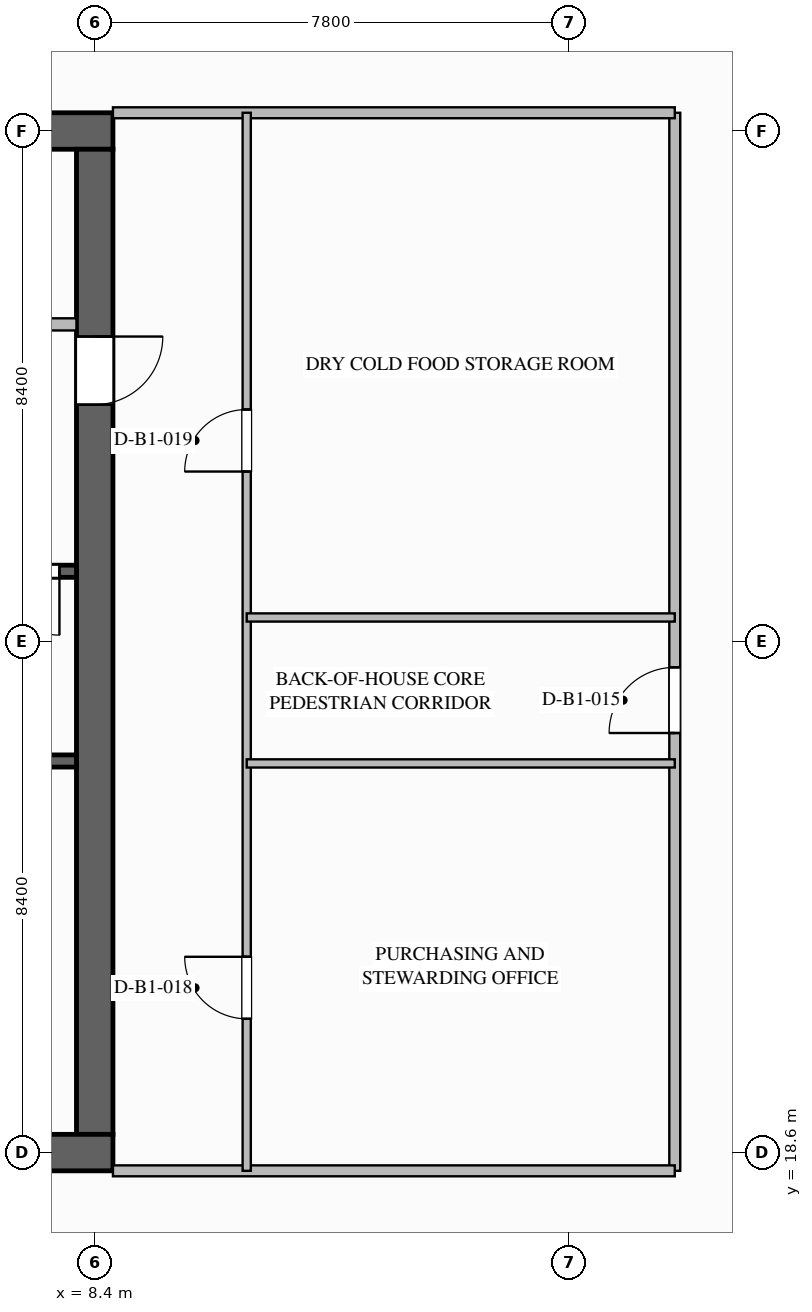
"""IFC4 building model, lengths in metres.
Left out: names, types, materials, properties, quantities, classifications, styles, units other than length and angle.
Written with IfcOpenShell. Run it as: python <this file> out.ifc"""

import sys

from ifc_helpers import new_model, si_unit, direction, frame, frame_2d, origin, place, context, subcontext, project, spatial, rectangle, extrude, element, fill, save


model = new_model("IFC4")
c1 = context("Model", 3, precision=1e-05, world=origin(), true_north=direction((0.0, 1.0)))
c2 = subcontext(c1, "Body", "Model", "MODEL_VIEW")
j1 = project(units=[si_unit("LENGTHUNIT", "METRE"), si_unit("PLANEANGLEUNIT", "RADIAN")], contexts=[c1])
p1 = place(None, origin())
s1 = spatial("IfcSite", under=j1, at=p1, CompositionType="ELEMENT")
p2 = place(p1, origin())
s2 = spatial("IfcBuilding", under=s1, at=p2, CompositionType="ELEMENT")
p3 = place(p2, frame((0.0, 0.0, -5.4)))
s3 = spatial("IfcBuildingStorey", under=s2, at=p3, CompositionType="ELEMENT", Elevation=-5.4)
p4 = place(p3, frame((-8.7, 35.4, 0.0), z_axis=(0.0, 0.0, 1.0), x_axis=(1.0, 0.0, 0.0)))
e1 = element("IfcWall", 1, at=p4, inside=s3, PredefinedType="SHEAR", context=c2, shape_type="SweptSolid", body=[
    extrude(rectangle(XDim=17.4, YDim=0.6, at=frame_2d((8.7, 0.0))), origin(), (0.0, 0.0, 1.0), 5.4),
])
p5 = place(p3, frame((8.4, 35.1, 0.0), z_axis=(0.0, 0.0, 1.0), x_axis=(0.0, -1.0, 0.0)))
e2 = element("IfcWall", 2, at=p5, inside=s3, PredefinedType="SHEAR", context=c2, shape_type="SweptSolid", body=[
    extrude(rectangle(XDim=16.2, YDim=0.6, at=frame_2d((8.1, 0.0))), origin(), (0.0, 0.0, 1.0), 5.4),
])
p6 = place(p5, frame((3.08, 0.0, 0.0)))
e3 = element("IfcOpeningElement", 3, at=p6, cuts=e2, PredefinedType="OPENING", context=c2, shape_type="SweptSolid", body=[
    extrude(rectangle(XDim=1.12, YDim=2.1, at=frame_2d((0.56, 1.05))), frame((0.0, 0.31, 0.0), z_axis=(0.0, -1.0, 0.0), x_axis=(1.0, 0.0, 0.0)), (0.0, 0.0, 1.0), 0.62),
])
p7 = place(p3, frame((8.7, 18.6, 0.0), z_axis=(0.0, 0.0, 1.0), x_axis=(-1.0, 0.0, 0.0)))
e4 = element("IfcWall", 4, at=p7, inside=s3, PredefinedType="SHEAR", context=c2, shape_type="SweptSolid", body=[
    extrude(rectangle(XDim=17.4, YDim=0.6, at=frame_2d((8.7, 0.0))), origin(), (0.0, 0.0, 1.0), 5.4),
])
p8 = place(p3, frame((0.0, 25.04, 0.0), z_axis=(0.0, 0.0, 1.0), x_axis=(1.0, 0.0, 0.0)))
e5 = element("IfcWall", 5, at=p8, inside=s3, PredefinedType="SOLIDWALL", context=c2, shape_type="SweptSolid", body=[
    extrude(rectangle(XDim=8.1, YDim=0.2, at=frame_2d((4.05, 0.0))), origin(), (0.0, 0.0, 1.0), 5.05),
])
p9 = place(p3, frame((8.1, 28.16, 0.0), z_axis=(0.0, 0.0, 1.0), x_axis=(-1.0, 0.0, 0.0)))
e6 = element("IfcWall", 6, at=p9, inside=s3, PredefinedType="SOLIDWALL", context=c2, shape_type="SweptSolid", body=[
    extrude(rectangle(XDim=8.1, YDim=0.2, at=frame_2d((4.05, 0.0))), origin(), (0.0, 0.0, 1.0), 5.05),
])
p10 = place(p9, frame((0.28, 0.0, 0.0)))
e7 = element("IfcOpeningElement", 7, at=p10, cuts=e6, PredefinedType="OPENING", context=c2, shape_type="SweptSolid", body=[
    extrude(rectangle(XDim=1.05, YDim=2.1, at=frame_2d((0.525, 1.05))), frame((0.0, 0.11, 0.0), z_axis=(0.0, -1.0, 0.0), x_axis=(1.0, 0.0, 0.0)), (0.0, 0.0, 1.0), 0.22),
])
p11 = place(p3, frame((3.1, 32.22, 0.0), z_axis=(0.0, 0.0, 1.0), x_axis=(1.0, 0.0, 0.0)))
e8 = element("IfcWall", 8, at=p11, inside=s3, PredefinedType="SOLIDWALL", context=c2, shape_type="SweptSolid", body=[
    extrude(rectangle(XDim=5.0, YDim=0.2, at=frame_2d((2.5, 0.0))), origin(), (0.0, 0.0, 1.0), 5.05),
])
p12 = place(p11, frame((0.55, 0.0, 0.0)))
e9 = element("IfcOpeningElement", 9, at=p12, cuts=e8, PredefinedType="OPENING", context=c2, shape_type="SweptSolid", body=[
    extrude(rectangle(XDim=1.2, YDim=2.2, at=frame_2d((0.6, 1.1))), frame((0.0, 0.11, 0.0), z_axis=(0.0, -1.0, 0.0), x_axis=(1.0, 0.0, 0.0)), (0.0, 0.0, 1.0), 0.22),
])
p13 = place(p11, frame((2.85, 0.0, 0.0)))
e10 = element("IfcOpeningElement", 10, at=p13, cuts=e8, PredefinedType="OPENING", context=c2, shape_type="SweptSolid", body=[
    extrude(rectangle(XDim=1.2, YDim=2.2, at=frame_2d((0.6, 1.1))), frame((0.0, 0.11, 0.0), z_axis=(0.0, -1.0, 0.0), x_axis=(1.0, 0.0, 0.0)), (0.0, 0.0, 1.0), 0.22),
])
p14 = place(p3, frame((17.94, 18.3, 0.0), z_axis=(0.0, 0.0, 1.0), x_axis=(0.0, 1.0, 0.0)))
e11 = element("IfcWall", 11, at=p14, inside=s3, PredefinedType="SOLIDWALL", context=c2, shape_type="SweptSolid", body=[
    extrude(rectangle(XDim=17.4, YDim=0.18, at=frame_2d((8.7, 0.0))), origin(), (0.0, 0.0, 1.0), 5.05),
])
p15 = place(p14, frame((7.2, 0.0, 0.0)))
e12 = element("IfcOpeningElement", 12, at=p15, cuts=e11, PredefinedType="OPENING", context=c2, shape_type="SweptSolid", body=[
    extrude(rectangle(XDim=1.08, YDim=2.04, at=frame_2d((0.54, 1.02))), frame((0.0, 0.1, 0.0), z_axis=(0.0, -1.0, 0.0), x_axis=(1.0, 0.0, 0.0)), (0.0, 0.0, 1.0), 0.2),
])
for number, where, z_axis, x_axis in (
    (13, (8.7, 18.3, 0.0), (0.0, 0.0, 1.0), (1.0, 0.0, 0.0)),
    (14, (8.7, 35.7, 0.0), (0.0, 0.0, 1.0), (1.0, 0.0, 0.0)),
):
    element("IfcWall", number, at=place(p3, frame(where, z_axis=z_axis, x_axis=x_axis)), inside=s3, PredefinedType="SOLIDWALL", context=c2, shape_type="SweptSolid", body=[
        extrude(rectangle(XDim=9.24, YDim=0.18, at=frame_2d((4.62, 0.0))), origin(), (0.0, 0.0, 1.0), 4.262),
    ])
p16 = place(p3, frame((10.9, 18.3, 0.0), z_axis=(0.0, 0.0, 1.0), x_axis=(0.0, 1.0, 0.0)))
e15 = element("IfcWall", 15, at=p16, inside=s3, PredefinedType="PARTITIONING", context=c2, shape_type="SweptSolid", body=[
    extrude(rectangle(XDim=17.4, YDim=0.135, at=frame_2d((8.7, 0.0))), origin(), (0.0, 0.0, 1.0), 5.05),
])
p17 = place(p16, frame((2.5, 0.0, 0.0)))
e16 = element("IfcOpeningElement", 16, at=p17, cuts=e15, PredefinedType="OPENING", context=c2, shape_type="SweptSolid", body=[
    extrude(rectangle(XDim=1.02, YDim=2.15, at=frame_2d((0.51, 1.075))), frame((0.0, 0.077, 0.0), z_axis=(0.0, -1.0, 0.0), x_axis=(1.0, 0.0, 0.0)), (0.0, 0.0, 1.0), 0.155),
])
p18 = place(p16, frame((11.5, 0.0, 0.0)))
e17 = element("IfcOpeningElement", 17, at=p18, cuts=e15, PredefinedType="OPENING", context=c2, shape_type="SweptSolid", body=[
    extrude(rectangle(XDim=1.02, YDim=2.15, at=frame_2d((0.51, 1.075))), frame((0.0, 0.077, 0.0), z_axis=(0.0, -1.0, 0.0), x_axis=(1.0, 0.0, 0.0)), (0.0, 0.0, 1.0), 0.155),
])
for number, where, z_axis, x_axis in (
    (18, (10.9, 25.0, 0.0), (0.0, 0.0, 1.0), (1.0, 0.0, 0.0)),
    (19, (10.9, 27.4, 0.0), (0.0, 0.0, 1.0), (1.0, 0.0, 0.0)),
):
    element("IfcWall", number, at=place(p3, frame(where, z_axis=z_axis, x_axis=x_axis)), inside=s3, PredefinedType="PARTITIONING", context=c2, shape_type="SweptSolid", body=[
        extrude(rectangle(XDim=7.04, YDim=0.135, at=frame_2d((3.52, 0.0))), origin(), (0.0, 0.0, 1.0), 5.05),
    ])
p19 = place(p10, origin())
e20 = element("IfcDoor", 20, at=p19, inside=s3, OperationType="SINGLE_SWING_LEFT", PredefinedType="DOOR", context=c2, shape_type="SweptSolid", body=[
    extrude(rectangle(XDim=1.05, YDim=2.1, at=frame_2d((0.525, 1.05))), frame((0.0, 0.025, 0.0), z_axis=(0.0, -1.0, 0.0), x_axis=(1.0, 0.0, 0.0)), (0.0, 0.0, 1.0), 0.05),
])
fill(e7, e20)
p20 = place(p6, origin())
e21 = element("IfcDoor", 21, at=p20, inside=s3, OperationType="SINGLE_SWING_LEFT", PredefinedType="DOOR", context=c2, shape_type="SweptSolid", body=[
    extrude(rectangle(XDim=1.12, YDim=2.1, at=frame_2d((0.56, 1.05))), frame((0.0, 0.025, 0.0), z_axis=(0.0, -1.0, 0.0), x_axis=(1.0, 0.0, 0.0)), (0.0, 0.0, 1.0), 0.05),
])
fill(e3, e21)
p21 = place(p15, origin())
e22 = element("IfcDoor", 22, at=p21, inside=s3, OperationType="SINGLE_SWING_LEFT", PredefinedType="DOOR", context=c2, shape_type="SweptSolid", body=[
    extrude(rectangle(XDim=1.08, YDim=2.04, at=frame_2d((0.54, 1.02))), frame((0.0, 0.025, 0.0), z_axis=(0.0, -1.0, 0.0), x_axis=(1.0, 0.0, 0.0)), (0.0, 0.0, 1.0), 0.05),
])
fill(e12, e22)
p22 = place(p17, origin())
e23 = element("IfcDoor", 23, at=p22, inside=s3, OperationType="SINGLE_SWING_RIGHT", PredefinedType="DOOR", context=c2, shape_type="SweptSolid", body=[
    extrude(rectangle(XDim=1.02, YDim=2.15, at=frame_2d((0.51, 1.075))), frame((0.0, 0.025, 0.0), z_axis=(0.0, -1.0, 0.0), x_axis=(1.0, 0.0, 0.0)), (0.0, 0.0, 1.0), 0.05),
])
fill(e16, e23)
p23 = place(p18, origin())
e24 = element("IfcDoor", 24, at=p23, inside=s3, OperationType="SINGLE_SWING_LEFT", PredefinedType="DOOR", context=c2, shape_type="SweptSolid", body=[
    extrude(rectangle(XDim=1.02, YDim=2.15, at=frame_2d((0.51, 1.075))), frame((0.0, 0.025, 0.0), z_axis=(0.0, -1.0, 0.0), x_axis=(1.0, 0.0, 0.0)), (0.0, 0.0, 1.0), 0.05),
])
fill(e17, e24)
save(model, sys.argv[1])
